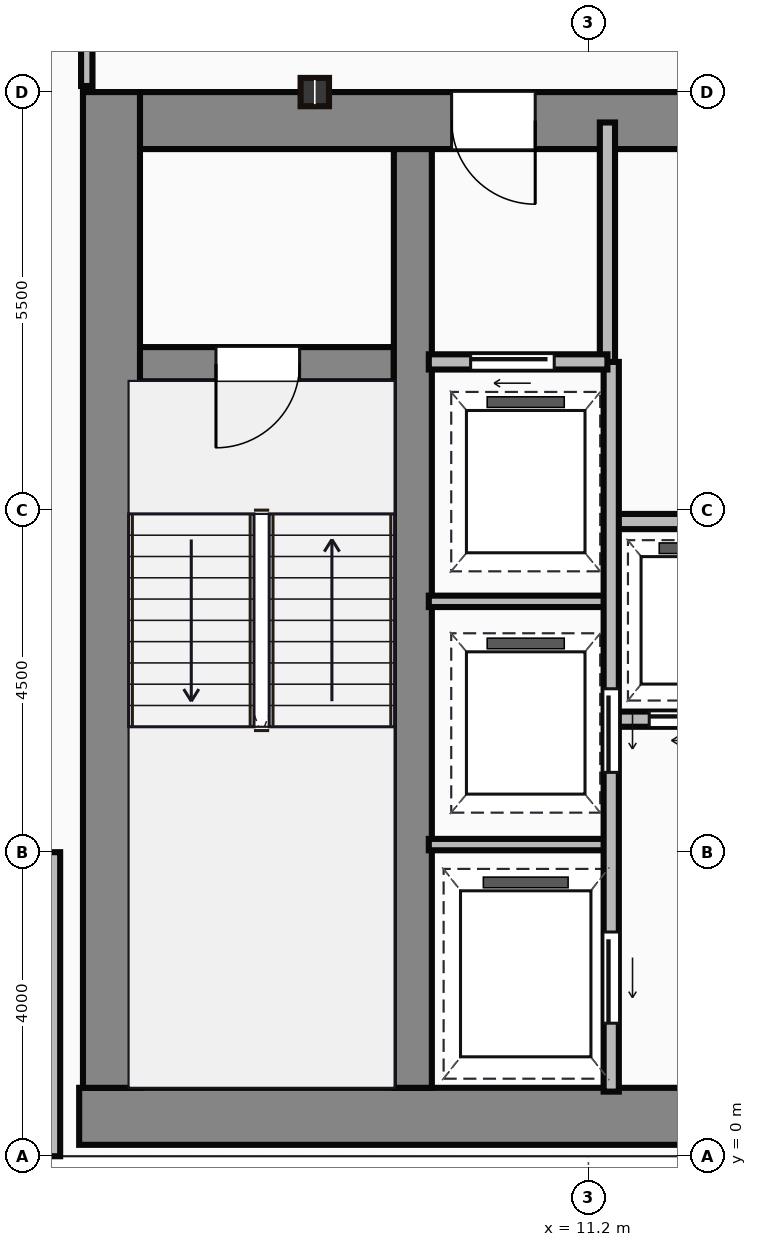
"""IFC4 building model, lengths in metres.
Left out: names, types, materials, properties, quantities, classifications, styles, units other than length and angle.
Written with IfcOpenShell. Run it as: python <this file> out.ifc"""

import sys

from ifc_helpers import new_model, si_unit, direction, frame, frame_2d, origin, origin_2d, place, context, subcontext, project, spatial, rectangle, i_section, extrude, source, transform, mapped, element, fill, save


model = new_model("IFC4")
c1 = context("Model", 3, precision=1e-05, world=origin(), true_north=direction((0.0, 1.0)))
c2 = subcontext(c1, "Body", "Model", "MODEL_VIEW")
j1 = project(units=[si_unit("LENGTHUNIT", "METRE"), si_unit("PLANEANGLEUNIT", "RADIAN")], contexts=[c1])
p1 = place(None, origin())
s1 = spatial("IfcSite", under=j1, at=p1, CompositionType="ELEMENT")
p2 = place(p1, origin())
s2 = spatial("IfcBuilding", under=s1, at=p2, CompositionType="ELEMENT")
p3 = place(p2, frame((0.0, 0.0, 180.75)))
s3 = spatial("IfcBuildingStorey", under=s2, at=p3, CompositionType="ELEMENT", Elevation=180.75)
m1 = source(origin(), c2, "Body", "SweptSolid", [
    extrude(rectangle(XDim=29.5, YDim=0.75, at=frame_2d((14.75, 0.0))), origin(), (0.0, 0.0, 1.0), 3.65),
])
p4 = place(p3, frame((4.5, 0.525, 0.0), z_axis=(0.0, 0.0, 1.0), x_axis=(1.0, 0.0, 0.0)))
e1 = element("IfcWall", 1, at=p4, inside=s3, PredefinedType="SHEAR", context=c2, shape_type="MappedRepresentation", body=[
    mapped(m1, transform((0.0, 0.0, 0.0))),
])
m2 = source(origin(), c2, "Body", "SweptSolid", [
    extrude(rectangle(XDim=13.1, YDim=0.75, at=frame_2d((6.55, 0.0))), origin(), (0.0, 0.0, 1.0), 3.65),
])
p5 = place(p3, frame((4.925, 0.9, 0.0), z_axis=(0.0, 0.0, 1.0), x_axis=(0.0, 1.0, 0.0)))
e2 = element("IfcWall", 2, at=p5, inside=s3, PredefinedType="SHEAR", context=c2, shape_type="MappedRepresentation", body=[
    mapped(m2, transform((0.0, 0.0, 0.0))),
])
m3 = source(origin(), c2, "Body", "SweptSolid", [
    extrude(rectangle(XDim=9.1, YDim=0.75, at=frame_2d((4.55, 0.0))), origin(), (0.0, 0.0, 1.0), 3.65),
])
p6 = place(p3, frame((5.3, 13.625, 0.0), z_axis=(0.0, 0.0, 1.0), x_axis=(1.0, 0.0, 0.0)))
e3 = element("IfcWall", 3, at=p6, inside=s3, PredefinedType="SHEAR", context=c2, shape_type="MappedRepresentation", body=[
    mapped(m3, transform((0.0, 0.0, 0.0))),
])
p7 = place(p6, frame((4.1, 0.0, 0.0)))
e4 = element("IfcOpeningElement", 4, at=p7, cuts=e3, PredefinedType="OPENING", context=c2, shape_type="SweptSolid", body=[
    extrude(rectangle(XDim=1.1, YDim=2.15, at=frame_2d((0.55, 1.075))), frame((0.0, 0.385, 0.0), z_axis=(0.0, -1.0, 0.0), x_axis=(1.0, 0.0, 0.0)), (0.0, 0.0, 1.0), 0.77),
])
m4 = source(origin(), c2, "Body", "SweptSolid", [
    extrude(rectangle(XDim=12.35, YDim=0.5, at=frame_2d((6.175, 0.0))), origin(), (0.0, 0.0, 1.0), 3.65),
])
p8 = place(p3, frame((8.89, 0.9, 0.0), z_axis=(0.0, 0.0, 1.0), x_axis=(0.0, 1.0, 0.0)))
e5 = element("IfcWall", 5, at=p8, inside=s3, PredefinedType="SHEAR", context=c2, shape_type="MappedRepresentation", body=[
    mapped(m4, transform((0.0, 0.0, 0.0))),
])
m5 = source(origin(), c2, "Body", "SweptSolid", [
    extrude(rectangle(XDim=3.39, YDim=0.45, at=frame_2d((1.695, 0.0))), origin(), (0.0, 0.0, 1.0), 3.65),
])
p9 = place(p3, frame((5.25, 10.42, 0.0), z_axis=(0.0, 0.0, 1.0), x_axis=(1.0, 0.0, 0.0)))
e6 = element("IfcWall", 6, at=p9, inside=s3, PredefinedType="SHEAR", context=c2, shape_type="MappedRepresentation", body=[
    mapped(m5, transform((0.0, 0.0, 0.0))),
])
p10 = place(p9, frame((1.05, 0.0, 0.0)))
e7 = element("IfcOpeningElement", 7, at=p10, cuts=e6, PredefinedType="OPENING", context=c2, shape_type="SweptSolid", body=[
    extrude(rectangle(XDim=1.1, YDim=2.15, at=frame_2d((0.55, 1.075))), frame((0.0, 0.235, 0.0), z_axis=(0.0, -1.0, 0.0), x_axis=(1.0, 0.0, 0.0)), (0.0, 0.0, 1.0), 0.47),
])
m6 = source(origin(), c2, "Body", "SweptSolid", [
    extrude(i_section(OverallWidth=0.374, OverallDepth=0.372, WebThickness=0.016, FlangeThickness=0.026, at=origin_2d()), origin(), (0.0, 0.0, 1.0), 3.65),
])
p11 = place(p3, frame((7.6, 14.0, 0.0), z_axis=(0.0, 0.0, 1.0), x_axis=(1.0, 0.0, 0.0)))
e8 = element("IfcColumn", 8, at=p11, inside=s3, PredefinedType="COLUMN", context=c2, shape_type="MappedRepresentation", body=[
    mapped(m6, transform((0.0, 0.0, 0.0))),
])
m7 = source(origin(), c2, "Body", "SweptSolid", [
    extrude(rectangle(XDim=4.0, YDim=0.25, at=frame_2d((2.0, 0.0))), origin(), (0.0, 0.0, 1.0), 3.4),
])
p12 = place(p3, frame((4.125, 4.0, 0.0), z_axis=(0.0, 0.0, 1.0), x_axis=(0.0, -1.0, 0.0)))
e9 = element("IfcWall", 9, at=p12, inside=s3, PredefinedType="STANDARD", context=c2, shape_type="MappedRepresentation", body=[
    mapped(m7, transform((0.0, 0.0, 0.0))),
])
m8 = source(origin(), c2, "Body", "SweptSolid", [
    extrude(rectangle(XDim=3.18, YDim=0.2, at=frame_2d((1.59, 0.0))), origin(), (0.0, 0.0, 1.0), 3.4),
])
p13 = place(p3, frame((11.45, 10.42, 0.0), z_axis=(0.0, 0.0, 1.0), x_axis=(0.0, 1.0, 0.0)))
e10 = element("IfcWall", 10, at=p13, inside=s3, PredefinedType="PARTITIONING", context=c2, shape_type="MappedRepresentation", body=[
    mapped(m8, transform((0.0, 0.0, 0.0))),
])
m9 = source(origin(), c2, "Body", "SweptSolid", [
    extrude(rectangle(XDim=2.35, YDim=0.2, at=frame_2d((1.175, 0.0))), origin(), (0.0, 0.0, 1.0), 3.4),
])
p14 = place(p3, frame((9.1, 10.45, 0.0), z_axis=(0.0, 0.0, 1.0), x_axis=(1.0, 0.0, 0.0)))
e11 = element("IfcWall", 11, at=p14, inside=s3, PredefinedType="PARTITIONING", context=c2, shape_type="MappedRepresentation", body=[
    mapped(m9, transform((0.0, 0.0, 0.0))),
])
p15 = place(p14, frame((0.55, 0.0, 0.0)))
e12 = element("IfcOpeningElement", 12, at=p15, cuts=e11, PredefinedType="OPENING", context=c2, shape_type="SweptSolid", body=[
    extrude(rectangle(XDim=1.1, YDim=2.15, at=frame_2d((0.55, 1.075))), frame((0.0, 0.11, 0.0), z_axis=(0.0, -1.0, 0.0), x_axis=(1.0, 0.0, 0.0)), (0.0, 0.0, 1.0), 0.22),
])
m10 = source(origin(), c2, "Body", "SweptSolid", [
    extrude(rectangle(XDim=9.6, YDim=0.2, at=frame_2d((4.8, 0.0))), origin(), (0.0, 0.0, 1.0), 3.4),
])
p16 = place(p3, frame((11.5, 0.85, 0.0), z_axis=(0.0, 0.0, 1.0), x_axis=(0.0, 1.0, 0.0)))
e13 = element("IfcWall", 13, at=p16, inside=s3, PredefinedType="PARTITIONING", context=c2, shape_type="MappedRepresentation", body=[
    mapped(m10, transform((0.0, 0.0, 0.0))),
])
p17 = place(p16, frame((4.2, 0.0, 0.0)))
e14 = element("IfcOpeningElement", 14, at=p17, cuts=e13, PredefinedType="OPENING", context=c2, shape_type="SweptSolid", body=[
    extrude(rectangle(XDim=1.1, YDim=2.15, at=frame_2d((0.55, 1.075))), frame((0.0, 0.11, 0.0), z_axis=(0.0, -1.0, 0.0), x_axis=(1.0, 0.0, 0.0)), (0.0, 0.0, 1.0), 0.22),
])
p18 = place(p16, frame((0.9, 0.0, 0.0)))
e15 = element("IfcOpeningElement", 15, at=p18, cuts=e13, PredefinedType="OPENING", context=c2, shape_type="SweptSolid", body=[
    extrude(rectangle(XDim=1.2, YDim=2.15, at=frame_2d((0.6, 1.075))), frame((0.0, 0.11, 0.0), z_axis=(0.0, -1.0, 0.0), x_axis=(1.0, 0.0, 0.0)), (0.0, 0.0, 1.0), 0.22),
])
m11 = source(origin(), c2, "Body", "SweptSolid", [
    extrude(rectangle(XDim=2.4, YDim=0.15, at=frame_2d((1.2, 0.0))), origin(), (0.0, 0.0, 1.0), 3.4),
])
for number, where, z_axis, x_axis in (
    (16, (9.1, 4.1, 0.0), (0.0, 0.0, 1.0), (1.0, 0.0, 0.0)),
    (17, (9.1, 7.3, 0.0), (0.0, 0.0, 1.0), (1.0, 0.0, 0.0)),
):
    element("IfcWall", number, at=place(p3, frame(where, z_axis=z_axis, x_axis=x_axis)), inside=s3, PredefinedType="PARTITIONING", context=c2, shape_type="MappedRepresentation", body=[
        mapped(m11, transform((0.0, 0.0, 0.0))),
    ])
m12 = source(origin(), c2, "Body", "SweptSolid", [
    extrude(rectangle(XDim=11.85, YDim=0.2, at=frame_2d((5.925, 0.0))), origin(), (0.0, 0.0, 1.0), 3.4),
])
p19 = place(p3, frame((11.55, 5.75, 0.0), z_axis=(0.0, 0.0, 1.0), x_axis=(1.0, 0.0, 0.0)))
e18 = element("IfcWall", 18, at=p19, inside=s3, PredefinedType="PARTITIONING", context=c2, shape_type="MappedRepresentation", body=[
    mapped(m12, transform((0.0, 0.0, 0.0))),
])
p20 = place(p19, frame((0.45, 0.0, 0.0)))
e19 = element("IfcOpeningElement", 19, at=p20, cuts=e18, PredefinedType="OPENING", context=c2, shape_type="SweptSolid", body=[
    extrude(rectangle(XDim=1.05, YDim=2.15, at=frame_2d((0.525, 1.075))), frame((0.0, 0.11, 0.0), z_axis=(0.0, -1.0, 0.0), x_axis=(1.0, 0.0, 0.0)), (0.0, 0.0, 1.0), 0.22),
])
p21 = place(p19, frame((2.4, 0.0, 0.0)))
e20 = element("IfcOpeningElement", 20, at=p21, cuts=e18, PredefinedType="OPENING", context=c2, shape_type="SweptSolid", body=[
    extrude(rectangle(XDim=1.05, YDim=2.15, at=frame_2d((0.525, 1.075))), frame((0.0, 0.11, 0.0), z_axis=(0.0, -1.0, 0.0), x_axis=(1.0, 0.0, 0.0)), (0.0, 0.0, 1.0), 0.22),
])
p22 = place(p19, frame((4.35, 0.0, 0.0)))
e21 = element("IfcOpeningElement", 21, at=p22, cuts=e18, PredefinedType="OPENING", context=c2, shape_type="SweptSolid", body=[
    extrude(rectangle(XDim=1.05, YDim=2.15, at=frame_2d((0.525, 1.075))), frame((0.0, 0.11, 0.0), z_axis=(0.0, -1.0, 0.0), x_axis=(1.0, 0.0, 0.0)), (0.0, 0.0, 1.0), 0.22),
])
p23 = place(p19, frame((6.3, 0.0, 0.0)))
e22 = element("IfcOpeningElement", 22, at=p23, cuts=e18, PredefinedType="OPENING", context=c2, shape_type="SweptSolid", body=[
    extrude(rectangle(XDim=1.05, YDim=2.15, at=frame_2d((0.525, 1.075))), frame((0.0, 0.11, 0.0), z_axis=(0.0, -1.0, 0.0), x_axis=(1.0, 0.0, 0.0)), (0.0, 0.0, 1.0), 0.22),
])
p24 = place(p19, frame((8.25, 0.0, 0.0)))
e23 = element("IfcOpeningElement", 23, at=p24, cuts=e18, PredefinedType="OPENING", context=c2, shape_type="SweptSolid", body=[
    extrude(rectangle(XDim=1.05, YDim=2.15, at=frame_2d((0.525, 1.075))), frame((0.0, 0.11, 0.0), z_axis=(0.0, -1.0, 0.0), x_axis=(1.0, 0.0, 0.0)), (0.0, 0.0, 1.0), 0.22),
])
p25 = place(p19, frame((10.2, 0.0, 0.0)))
e24 = element("IfcOpeningElement", 24, at=p25, cuts=e18, PredefinedType="OPENING", context=c2, shape_type="SweptSolid", body=[
    extrude(rectangle(XDim=1.05, YDim=2.15, at=frame_2d((0.525, 1.075))), frame((0.0, 0.11, 0.0), z_axis=(0.0, -1.0, 0.0), x_axis=(1.0, 0.0, 0.0)), (0.0, 0.0, 1.0), 0.22),
])
p26 = place(p3, frame((11.55, 8.35, 0.0), z_axis=(0.0, 0.0, 1.0), x_axis=(1.0, 0.0, 0.0)))
e25 = element("IfcWall", 25, at=p26, inside=s3, PredefinedType="PARTITIONING", context=c2, shape_type="MappedRepresentation", body=[
    mapped(m12, transform((0.0, 0.0, 0.0))),
])
m13 = source(origin(), c2, "Body", "SweptSolid", [
    extrude(rectangle(XDim=2.22, YDim=0.15, at=frame_2d((1.11, 0.0))), origin(), (0.0, 0.0, 1.0), 3.4),
])
p27 = place(p3, frame((4.6, 14.08, 0.0), z_axis=(0.0, 0.0, 1.0), x_axis=(0.0, 1.0, 0.0)))
e26 = element("IfcWall", 26, at=p27, inside=s3, PredefinedType="PARTITIONING", context=c2, shape_type="MappedRepresentation", body=[
    mapped(m13, transform((0.0, 0.0, 0.0))),
])
m14 = source(origin(), c2, "Body", "SweptSolid", [
    extrude(rectangle(XDim=1.1, YDim=2.15, at=frame_2d((0.55, 1.075))), frame((0.0, 0.025, 0.0), z_axis=(0.0, -1.0, 0.0), x_axis=(1.0, 0.0, 0.0)), (0.0, 0.0, 1.0), 0.05),
])
p28 = place(p10, frame((1.1, 0.0, 0.0), z_axis=(0.0, 0.0, 1.0), x_axis=(-1.0, 0.0, 0.0)))
e27 = element("IfcDoor", 27, at=p28, inside=s3, OperationType="SINGLE_SWING_LEFT", PredefinedType="DOOR", context=c2, shape_type="MappedRepresentation", body=[
    mapped(m14, transform((0.0, 0.0, 0.0))),
])
fill(e7, e27)
p29 = place(p7, origin())
e28 = element("IfcDoor", 28, at=p29, inside=s3, OperationType="SINGLE_SWING_RIGHT", PredefinedType="DOOR", context=c2, shape_type="MappedRepresentation", body=[
    mapped(m14, transform((0.0, 0.0, 0.0))),
])
fill(e4, e28)
p30 = place(p15, origin())
e29 = element("IfcDoor", 29, at=p30, inside=s3, OperationType="SLIDING_TO_LEFT", PredefinedType="DOOR", context=c2, shape_type="MappedRepresentation", body=[
    mapped(m14, transform((0.0, 0.0, 0.0))),
])
fill(e12, e29)
p31 = place(p17, frame((1.1, 0.0, 0.0), z_axis=(0.0, 0.0, 1.0), x_axis=(-1.0, 0.0, 0.0)))
e30 = element("IfcDoor", 30, at=p31, inside=s3, OperationType="SLIDING_TO_LEFT", PredefinedType="DOOR", context=c2, shape_type="MappedRepresentation", body=[
    mapped(m14, transform((0.0, 0.0, 0.0))),
])
fill(e14, e30)
m15 = source(origin(), c2, "Body", "SweptSolid", [
    extrude(rectangle(XDim=1.2, YDim=2.15, at=frame_2d((0.6, 1.075))), frame((0.0, 0.025, 0.0), z_axis=(0.0, -1.0, 0.0), x_axis=(1.0, 0.0, 0.0)), (0.0, 0.0, 1.0), 0.05),
])
p32 = place(p18, frame((1.2, 0.0, 0.0), z_axis=(0.0, 0.0, 1.0), x_axis=(-1.0, 0.0, 0.0)))
e31 = element("IfcDoor", 31, at=p32, inside=s3, OperationType="SLIDING_TO_LEFT", PredefinedType="DOOR", context=c2, shape_type="MappedRepresentation", body=[
    mapped(m15, transform((0.0, 0.0, 0.0))),
])
fill(e15, e31)
m16 = source(origin(), c2, "Body", "SweptSolid", [
    extrude(rectangle(XDim=1.05, YDim=2.15, at=frame_2d((0.525, 1.075))), frame((0.0, 0.025, 0.0), z_axis=(0.0, -1.0, 0.0), x_axis=(1.0, 0.0, 0.0)), (0.0, 0.0, 1.0), 0.05),
])
p33 = place(p20, frame((1.05, 0.0, 0.0), z_axis=(0.0, 0.0, 1.0), x_axis=(-1.0, 0.0, 0.0)))
e32 = element("IfcDoor", 32, at=p33, inside=s3, OperationType="SLIDING_TO_LEFT", PredefinedType="DOOR", context=c2, shape_type="MappedRepresentation", body=[
    mapped(m16, transform((0.0, 0.0, 0.0))),
])
fill(e19, e32)
save(model, sys.argv[1])
